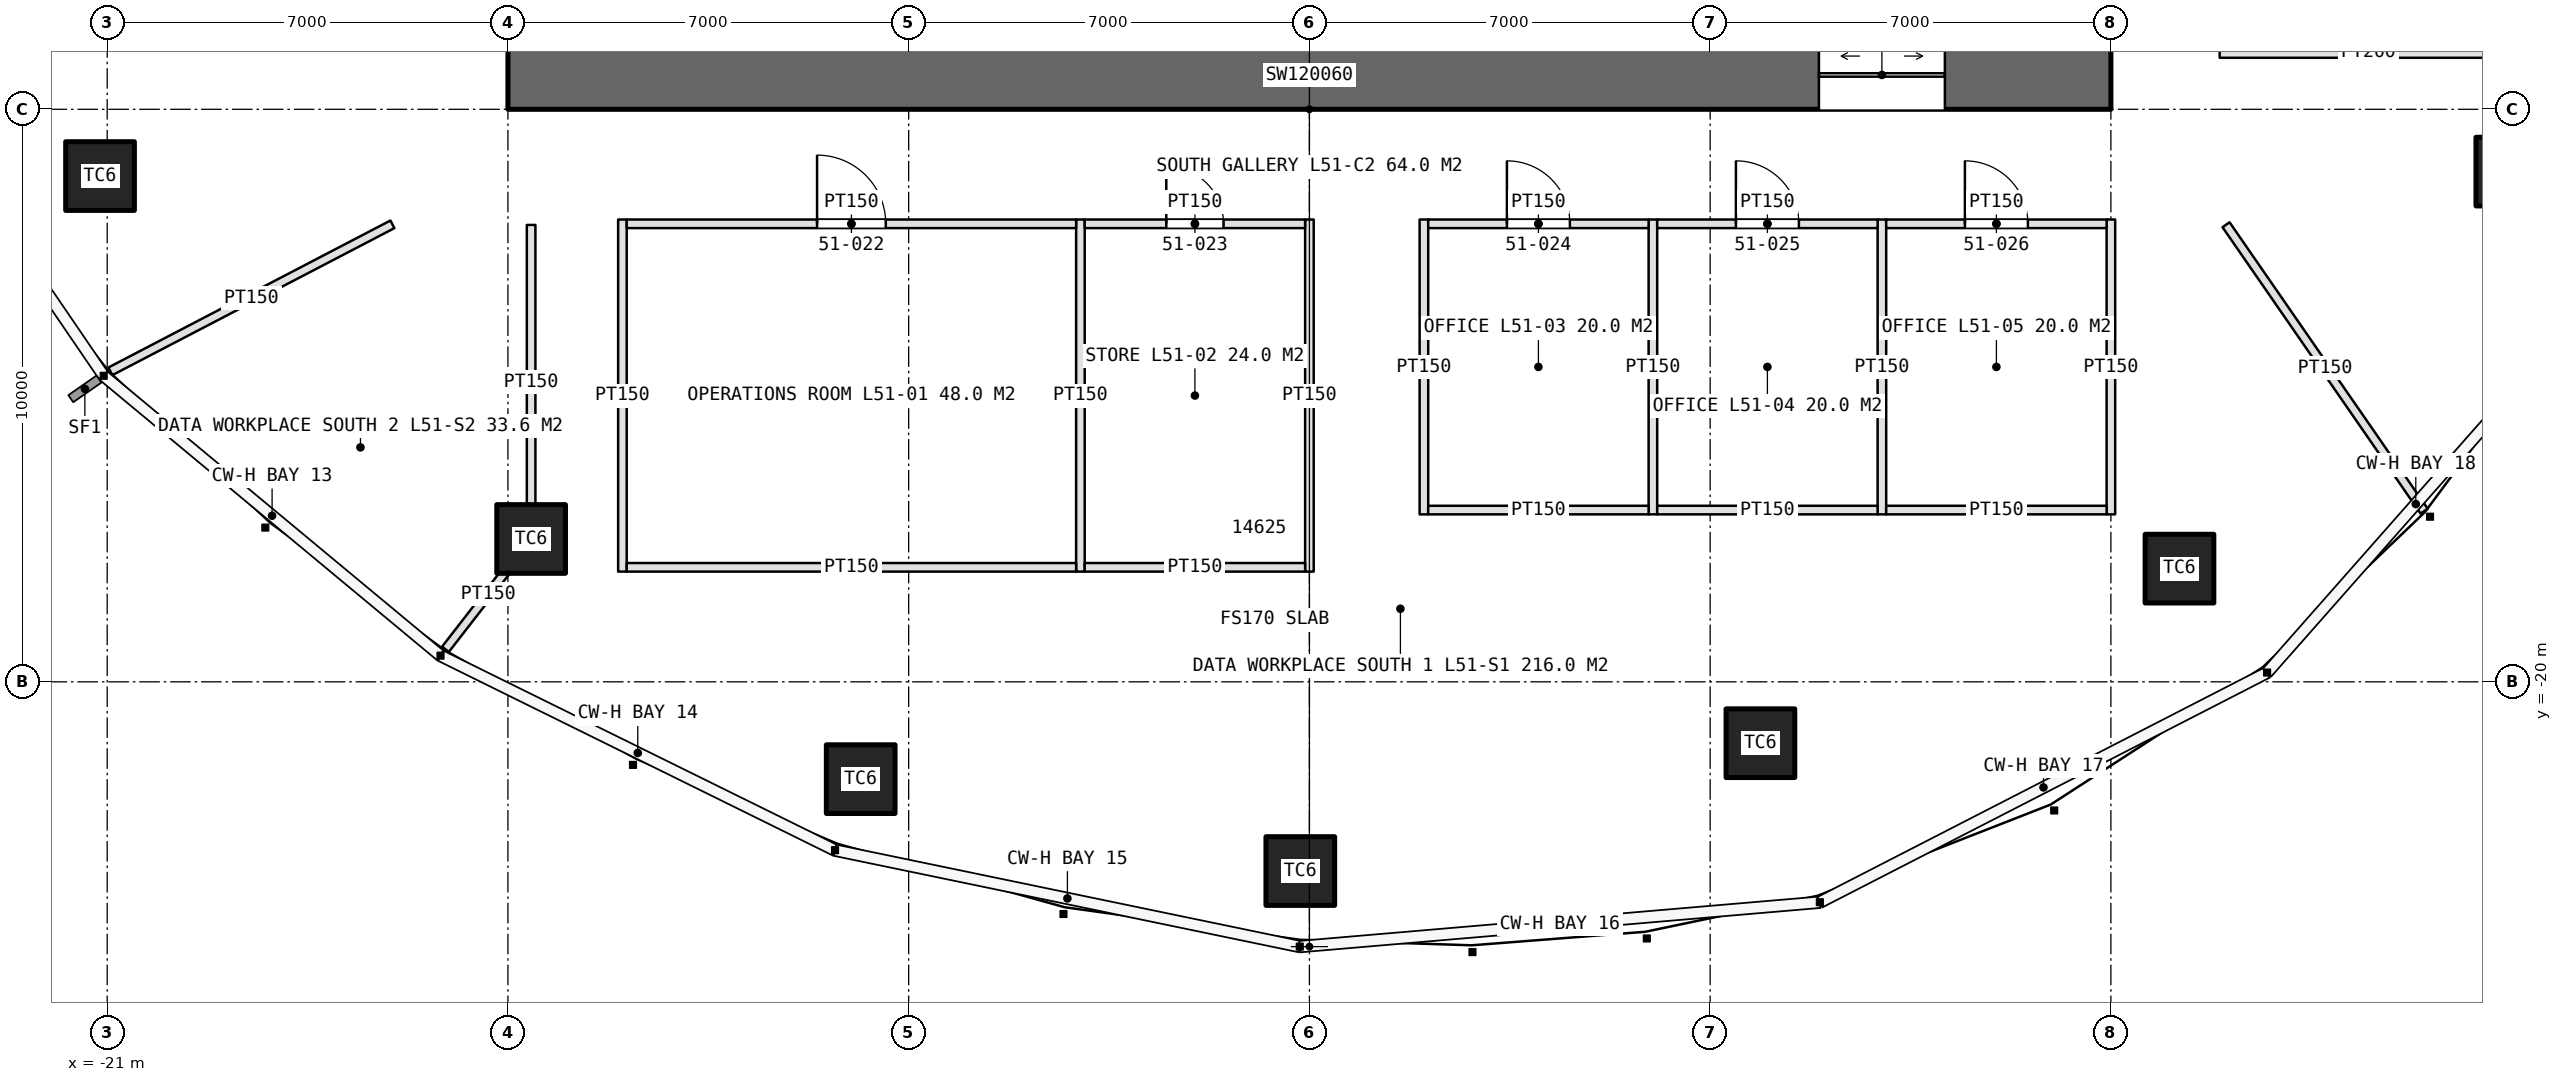
"""IFC4 building model, lengths in metres.
Left out: names, types, materials, properties, quantities, classifications, styles, units other than length and angle.
Written with IfcOpenShell. Run it as: python <this file> out.ifc"""

import sys

from ifc_helpers import new_model, si_unit, direction, frame, frame_2d, origin, origin_2d, place, context, subcontext, project, spatial, rectangle, extrude, element, fill, save


model = new_model("IFC4")
c1 = context("Model", 3, precision=1e-05, world=origin(), true_north=direction((0.0, 1.0)))
c2 = subcontext(c1, "Body", "Model", "MODEL_VIEW")
j1 = project(units=[si_unit("LENGTHUNIT", "METRE"), si_unit("PLANEANGLEUNIT", "RADIAN")], contexts=[c1])
p1 = place(None, origin())
s1 = spatial("IfcSite", under=j1, at=p1, CompositionType="ELEMENT")
p2 = place(p1, origin())
s2 = spatial("IfcBuilding", under=s1, at=p2, CompositionType="ELEMENT")
p3 = place(p2, frame((0.0, 0.0, 232.6)))
s3 = spatial("IfcBuildingStorey", under=s2, at=p3, CompositionType="ELEMENT", Elevation=232.6)
p4 = place(p3, frame((-14.0, -9.4, 0.0), z_axis=(0.0, 0.0, 1.0), x_axis=(1.0, 0.0, 0.0)))
e1 = element("IfcWall", 1, at=p4, inside=s3, PredefinedType="SHEAR", context=c2, shape_type="SweptSolid", body=[
    extrude(rectangle(XDim=28.0, YDim=1.2, at=frame_2d((14.0, 0.0))), origin(), (0.0, 0.0, 1.0), 4.2),
])
p5 = place(p4, frame((22.9, 0.0, 0.0)))
e2 = element("IfcOpeningElement", 2, at=p5, cuts=e1, PredefinedType="OPENING", context=c2, shape_type="SweptSolid", body=[
    extrude(rectangle(XDim=2.2, YDim=2.7, at=frame_2d((1.1, 1.35))), frame((0.0, 0.61, 0.0), z_axis=(0.0, -1.0, 0.0), x_axis=(1.0, 0.0, 0.0)), (0.0, 0.0, 1.0), 1.22),
])
for number, where, z_axis, x_axis in (
    (3, (-21.125, -11.166, 0.0), (0.0, 0.0, 1.0), (1.0, 0.0, 0.0)),
    (4, (-13.595, -17.505, 0.0), (0.0, 0.0, 1.0), (1.0, 0.0, 0.0)),
    (5, (-7.838, -21.7, 0.0), (0.0, 0.0, 1.0), (1.0, 0.0, 0.0)),
    (6, (-0.159, -23.305, 0.0), (0.0, 0.0, 1.0), (1.0, 0.0, 0.0)),
    (7, (7.878, -21.072, 0.0), (0.0, 0.0, 1.0), (1.0, 0.0, 0.0)),
    (8, (15.198, -18.023, 0.0), (0.0, 0.0, 1.0), (1.0, 0.0, 0.0)),
    (9, (20.977, -11.088, 0.0), (0.0, 0.0, 1.0), (1.0, 0.0, 0.0)),
):
    element("IfcColumn", number, at=place(p3, frame(where, z_axis=z_axis, x_axis=x_axis)), inside=s3, PredefinedType="COLUMN", context=c2, shape_type="SweptSolid", body=[
        extrude(rectangle(XDim=1.2, YDim=1.2, at=origin_2d()), origin(), (0.0, 0.0, 1.0), 4.2),
    ])
for number, where, z_axis, x_axis in (
    (10, (-12.0, -11.925, 0.0), (0.0, 0.0, 1.0), (0.0, -1.0, 0.0)),
    (11, (-4.0, -11.925, 0.0), (0.0, 0.0, 1.0), (0.0, -1.0, 0.0)),
    (12, (0.0, -11.925, 0.0), (0.0, 0.0, 1.0), (0.0, -1.0, 0.0)),
):
    element("IfcWall", number, at=place(p3, frame(where, z_axis=z_axis, x_axis=x_axis)), inside=s3, PredefinedType="PARTITIONING", context=c2, shape_type="SweptSolid", body=[
        extrude(rectangle(XDim=6.15, YDim=0.15, at=frame_2d((3.075, 0.0))), origin(), (0.0, 0.0, 1.0), 3.0),
    ])
p6 = place(p3, frame((-11.925, -12.0, 0.0), z_axis=(0.0, 0.0, 1.0), x_axis=(1.0, 0.0, 0.0)))
e13 = element("IfcWall", 13, at=p6, inside=s3, PredefinedType="PARTITIONING", context=c2, shape_type="SweptSolid", body=[
    extrude(rectangle(XDim=7.85, YDim=0.15, at=frame_2d((3.925, 0.0))), origin(), (0.0, 0.0, 1.0), 3.0),
])
p7 = place(p6, frame((3.325, 0.0, 0.0)))
e14 = element("IfcOpeningElement", 14, at=p7, cuts=e13, PredefinedType="OPENING", context=c2, shape_type="SweptSolid", body=[
    extrude(rectangle(XDim=1.2, YDim=2.4, at=frame_2d((0.6, 1.2))), frame((0.0, 0.085, 0.0), z_axis=(0.0, -1.0, 0.0), x_axis=(1.0, 0.0, 0.0)), (0.0, 0.0, 1.0), 0.17),
])
p8 = place(p3, frame((-11.925, -18.0, 0.0), z_axis=(0.0, 0.0, 1.0), x_axis=(1.0, 0.0, 0.0)))
e15 = element("IfcWall", 15, at=p8, inside=s3, PredefinedType="PARTITIONING", context=c2, shape_type="SweptSolid", body=[
    extrude(rectangle(XDim=7.85, YDim=0.15, at=frame_2d((3.925, 0.0))), origin(), (0.0, 0.0, 1.0), 3.0),
])
p9 = place(p3, frame((-3.925, -12.0, 0.0), z_axis=(0.0, 0.0, 1.0), x_axis=(1.0, 0.0, 0.0)))
e16 = element("IfcWall", 16, at=p9, inside=s3, PredefinedType="PARTITIONING", context=c2, shape_type="SweptSolid", body=[
    extrude(rectangle(XDim=3.85, YDim=0.15, at=frame_2d((1.925, 0.0))), origin(), (0.0, 0.0, 1.0), 3.0),
])
p10 = place(p9, frame((1.425, 0.0, 0.0)))
e17 = element("IfcOpeningElement", 17, at=p10, cuts=e16, PredefinedType="OPENING", context=c2, shape_type="SweptSolid", body=[
    extrude(rectangle(XDim=1.0, YDim=2.2, at=frame_2d((0.5, 1.1))), frame((0.0, 0.085, 0.0), z_axis=(0.0, -1.0, 0.0), x_axis=(1.0, 0.0, 0.0)), (0.0, 0.0, 1.0), 0.17),
])
p11 = place(p3, frame((-3.925, -18.0, 0.0), z_axis=(0.0, 0.0, 1.0), x_axis=(1.0, 0.0, 0.0)))
e18 = element("IfcWall", 18, at=p11, inside=s3, PredefinedType="PARTITIONING", context=c2, shape_type="SweptSolid", body=[
    extrude(rectangle(XDim=3.85, YDim=0.15, at=frame_2d((1.925, 0.0))), origin(), (0.0, 0.0, 1.0), 3.0),
])
for number, where, z_axis, x_axis in (
    (19, (2.0, -11.925, 0.0), (0.0, 0.0, 1.0), (0.0, -1.0, 0.0)),
    (20, (6.0, -11.925, 0.0), (0.0, 0.0, 1.0), (0.0, -1.0, 0.0)),
    (21, (10.0, -11.925, 0.0), (0.0, 0.0, 1.0), (0.0, -1.0, 0.0)),
    (22, (14.0, -11.925, 0.0), (0.0, 0.0, 1.0), (0.0, -1.0, 0.0)),
):
    element("IfcWall", number, at=place(p3, frame(where, z_axis=z_axis, x_axis=x_axis)), inside=s3, PredefinedType="PARTITIONING", context=c2, shape_type="SweptSolid", body=[
        extrude(rectangle(XDim=5.15, YDim=0.15, at=frame_2d((2.575, 0.0))), origin(), (0.0, 0.0, 1.0), 3.0),
    ])
p12 = place(p3, frame((2.075, -12.0, 0.0), z_axis=(0.0, 0.0, 1.0), x_axis=(1.0, 0.0, 0.0)))
e23 = element("IfcWall", 23, at=p12, inside=s3, PredefinedType="PARTITIONING", context=c2, shape_type="SweptSolid", body=[
    extrude(rectangle(XDim=3.85, YDim=0.15, at=frame_2d((1.925, 0.0))), origin(), (0.0, 0.0, 1.0), 3.0),
])
p13 = place(p12, frame((1.375, 0.0, 0.0)))
e24 = element("IfcOpeningElement", 24, at=p13, cuts=e23, PredefinedType="OPENING", context=c2, shape_type="SweptSolid", body=[
    extrude(rectangle(XDim=1.1, YDim=2.3, at=frame_2d((0.55, 1.15))), frame((0.0, 0.085, 0.0), z_axis=(0.0, -1.0, 0.0), x_axis=(1.0, 0.0, 0.0)), (0.0, 0.0, 1.0), 0.17),
])
p14 = place(p3, frame((2.075, -17.0, 0.0), z_axis=(0.0, 0.0, 1.0), x_axis=(1.0, 0.0, 0.0)))
e25 = element("IfcWall", 25, at=p14, inside=s3, PredefinedType="PARTITIONING", context=c2, shape_type="SweptSolid", body=[
    extrude(rectangle(XDim=3.85, YDim=0.15, at=frame_2d((1.925, 0.0))), origin(), (0.0, 0.0, 1.0), 3.0),
])
p15 = place(p3, frame((6.075, -12.0, 0.0), z_axis=(0.0, 0.0, 1.0), x_axis=(1.0, 0.0, 0.0)))
e26 = element("IfcWall", 26, at=p15, inside=s3, PredefinedType="PARTITIONING", context=c2, shape_type="SweptSolid", body=[
    extrude(rectangle(XDim=3.85, YDim=0.15, at=frame_2d((1.925, 0.0))), origin(), (0.0, 0.0, 1.0), 3.0),
])
p16 = place(p15, frame((1.375, 0.0, 0.0)))
e27 = element("IfcOpeningElement", 27, at=p16, cuts=e26, PredefinedType="OPENING", context=c2, shape_type="SweptSolid", body=[
    extrude(rectangle(XDim=1.1, YDim=2.3, at=frame_2d((0.55, 1.15))), frame((0.0, 0.085, 0.0), z_axis=(0.0, -1.0, 0.0), x_axis=(1.0, 0.0, 0.0)), (0.0, 0.0, 1.0), 0.17),
])
p17 = place(p3, frame((6.075, -17.0, 0.0), z_axis=(0.0, 0.0, 1.0), x_axis=(1.0, 0.0, 0.0)))
e28 = element("IfcWall", 28, at=p17, inside=s3, PredefinedType="PARTITIONING", context=c2, shape_type="SweptSolid", body=[
    extrude(rectangle(XDim=3.85, YDim=0.15, at=frame_2d((1.925, 0.0))), origin(), (0.0, 0.0, 1.0), 3.0),
])
p18 = place(p3, frame((10.075, -12.0, 0.0), z_axis=(0.0, 0.0, 1.0), x_axis=(1.0, 0.0, 0.0)))
e29 = element("IfcWall", 29, at=p18, inside=s3, PredefinedType="PARTITIONING", context=c2, shape_type="SweptSolid", body=[
    extrude(rectangle(XDim=3.85, YDim=0.15, at=frame_2d((1.925, 0.0))), origin(), (0.0, 0.0, 1.0), 3.0),
])
p19 = place(p18, frame((1.375, 0.0, 0.0)))
e30 = element("IfcOpeningElement", 30, at=p19, cuts=e29, PredefinedType="OPENING", context=c2, shape_type="SweptSolid", body=[
    extrude(rectangle(XDim=1.1, YDim=2.3, at=frame_2d((0.55, 1.15))), frame((0.0, 0.085, 0.0), z_axis=(0.0, -1.0, 0.0), x_axis=(1.0, 0.0, 0.0)), (0.0, 0.0, 1.0), 0.17),
])
p20 = place(p3, frame((10.075, -17.0, 0.0), z_axis=(0.0, 0.0, 1.0), x_axis=(1.0, 0.0, 0.0)))
e31 = element("IfcWall", 31, at=p20, inside=s3, PredefinedType="PARTITIONING", context=c2, shape_type="SweptSolid", body=[
    extrude(rectangle(XDim=3.85, YDim=0.15, at=frame_2d((1.925, 0.0))), origin(), (0.0, 0.0, 1.0), 3.0),
])
p21 = place(p3, frame((15.9, -9.0, 0.0), z_axis=(0.0, 0.0, 1.0), x_axis=(1.0, 0.0, 0.0)))
e32 = element("IfcWall", 32, at=p21, inside=s3, PredefinedType="PARTITIONING", context=c2, shape_type="SweptSolid", body=[
    extrude(rectangle(XDim=5.2, YDim=0.2, at=frame_2d((2.6, 0.0))), origin(), (0.0, 0.0, 1.0), 3.0),
])
p22 = place(p3, frame((-16.018, -12.009, 0.0), z_axis=(0.0, 0.0, 1.0), x_axis=(-0.886831549241, -0.462092851351, 0.0)))
e33 = element("IfcWall", 33, at=p22, inside=s3, PredefinedType="PARTITIONING", context=c2, shape_type="SweptSolid", body=[
    extrude(rectangle(XDim=5.555, YDim=0.15, at=frame_2d((2.778, 0.0))), origin(), (0.0, 0.0, 1.0), 3.0),
])
p23 = place(p3, frame((16.011, -12.016, 0.0), z_axis=(0.0, 0.0, 1.0), x_axis=(0.568863489071, -0.822431961199, 0.0)))
e34 = element("IfcWall", 34, at=p23, inside=s3, PredefinedType="PARTITIONING", context=c2, shape_type="SweptSolid", body=[
    extrude(rectangle(XDim=6.083, YDim=0.15, at=frame_2d((3.042, 0.0))), origin(), (0.0, 0.0, 1.0), 3.0),
])
p24 = place(p3, frame((-13.595, -12.02, 0.0), z_axis=(0.0, 0.0, 1.0), x_axis=(0.0, -1.0, 0.0)))
e35 = element("IfcWall", 35, at=p24, inside=s3, PredefinedType="PARTITIONING", context=c2, shape_type="SweptSolid", body=[
    extrude(rectangle(XDim=5.485, YDim=0.15, at=frame_2d((2.742, 0.0))), origin(), (0.0, 0.0, 1.0), 3.0),
])
p25 = place(p3, frame((-13.595, -17.505, 0.0), z_axis=(0.0, 0.0, 1.0), x_axis=(-0.613379342147, -0.78978844169, 0.0)))
e36 = element("IfcWall", 36, at=p25, inside=s3, PredefinedType="PARTITIONING", context=c2, shape_type="SweptSolid", body=[
    extrude(rectangle(XDim=2.44, YDim=0.15, at=frame_2d((1.22, 0.0))), origin(), (0.0, 0.0, 1.0), 3.0),
])
p26 = place(p5, origin())
e37 = element("IfcDoor", 37, at=p26, inside=s3, OperationType="DOUBLE_DOOR_SLIDING", PredefinedType="DOOR", context=c2, shape_type="SweptSolid", body=[
    extrude(rectangle(XDim=2.2, YDim=2.7, at=frame_2d((1.1, 1.35))), frame((0.0, 0.025, 0.0), z_axis=(0.0, -1.0, 0.0), x_axis=(1.0, 0.0, 0.0)), (0.0, 0.0, 1.0), 0.05),
])
fill(e2, e37)
p27 = place(p7, origin())
e38 = element("IfcDoor", 38, at=p27, inside=s3, OperationType="SINGLE_SWING_LEFT", PredefinedType="DOOR", context=c2, shape_type="SweptSolid", body=[
    extrude(rectangle(XDim=1.2, YDim=2.4, at=frame_2d((0.6, 1.2))), frame((0.0, 0.025, 0.0), z_axis=(0.0, -1.0, 0.0), x_axis=(1.0, 0.0, 0.0)), (0.0, 0.0, 1.0), 0.05),
])
fill(e14, e38)
p28 = place(p10, origin())
e39 = element("IfcDoor", 39, at=p28, inside=s3, OperationType="SINGLE_SWING_LEFT", PredefinedType="DOOR", context=c2, shape_type="SweptSolid", body=[
    extrude(rectangle(XDim=1.0, YDim=2.2, at=frame_2d((0.5, 1.1))), frame((0.0, 0.025, 0.0), z_axis=(0.0, -1.0, 0.0), x_axis=(1.0, 0.0, 0.0)), (0.0, 0.0, 1.0), 0.05),
])
fill(e17, e39)
p29 = place(p13, origin())
e40 = element("IfcDoor", 40, at=p29, inside=s3, OperationType="SINGLE_SWING_LEFT", PredefinedType="DOOR", context=c2, shape_type="SweptSolid", body=[
    extrude(rectangle(XDim=1.1, YDim=2.3, at=frame_2d((0.55, 1.15))), frame((0.0, 0.025, 0.0), z_axis=(0.0, -1.0, 0.0), x_axis=(1.0, 0.0, 0.0)), (0.0, 0.0, 1.0), 0.05),
])
fill(e24, e40)
p30 = place(p16, origin())
e41 = element("IfcDoor", 41, at=p30, inside=s3, OperationType="SINGLE_SWING_LEFT", PredefinedType="DOOR", context=c2, shape_type="SweptSolid", body=[
    extrude(rectangle(XDim=1.1, YDim=2.3, at=frame_2d((0.55, 1.15))), frame((0.0, 0.025, 0.0), z_axis=(0.0, -1.0, 0.0), x_axis=(1.0, 0.0, 0.0)), (0.0, 0.0, 1.0), 0.05),
])
fill(e27, e41)
p31 = place(p19, origin())
e42 = element("IfcDoor", 42, at=p31, inside=s3, OperationType="SINGLE_SWING_LEFT", PredefinedType="DOOR", context=c2, shape_type="SweptSolid", body=[
    extrude(rectangle(XDim=1.1, YDim=2.3, at=frame_2d((0.55, 1.15))), frame((0.0, 0.025, 0.0), z_axis=(0.0, -1.0, 0.0), x_axis=(1.0, 0.0, 0.0)), (0.0, 0.0, 1.0), 0.05),
])
fill(e30, e42)
save(model, sys.argv[1])
